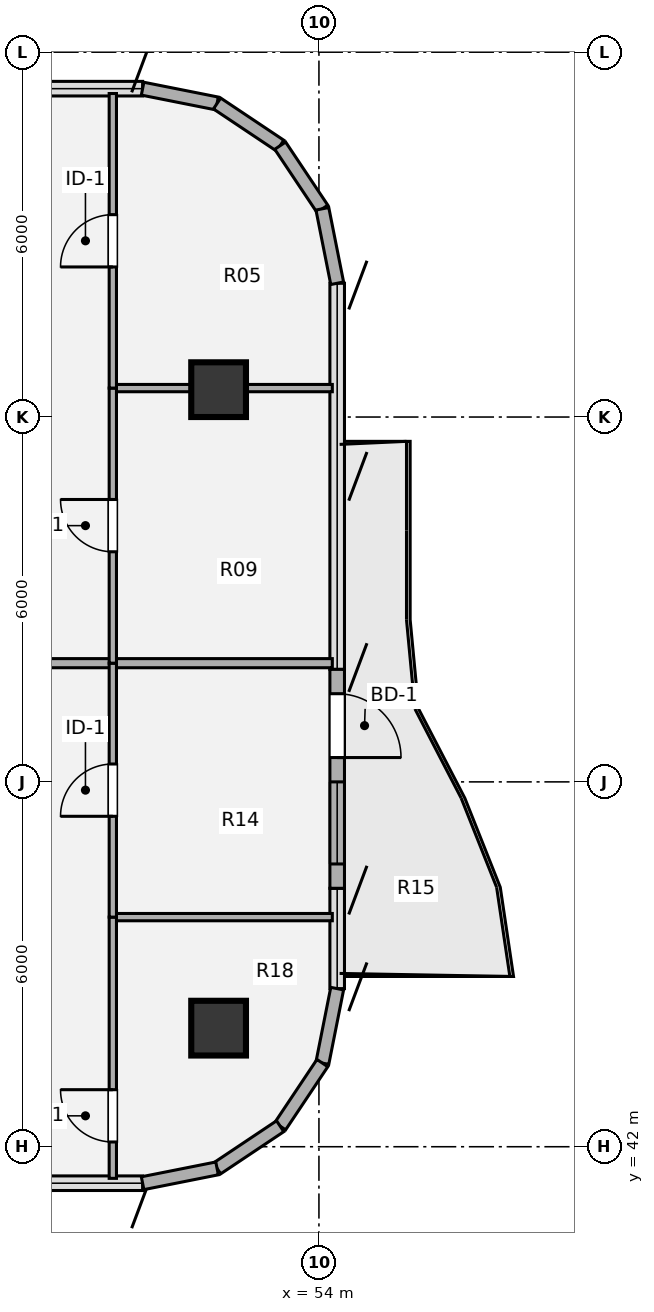
"""IFC4 building model, lengths in metres.
Left out: names, types, materials, properties, quantities, classifications, styles, units other than length and angle.
Written with IfcOpenShell. Run it as: python <this file> out.ifc"""

import sys

from ifc_helpers import new_model, si_unit, direction, frame, frame_2d, origin, origin_2d, place, context, subcontext, project, spatial, rectangle, hollow_circle, extrude, source, transform, mapped, element, fill, save


model = new_model("IFC4")
c1 = context("Model", 3, precision=1e-05, world=origin(), true_north=direction((0.0, 1.0)))
c2 = subcontext(c1, "Body", "Model", "MODEL_VIEW")
j1 = project(units=[si_unit("LENGTHUNIT", "METRE"), si_unit("PLANEANGLEUNIT", "RADIAN")], contexts=[c1])
p1 = place(None, origin())
s1 = spatial("IfcSite", under=j1, at=p1, CompositionType="ELEMENT")
p2 = place(p1, origin())
s2 = spatial("IfcBuilding", under=s1, at=p2, CompositionType="ELEMENT")
p3 = place(p2, frame((0.0, 0.0, 226.8)))
s3 = spatial("IfcBuildingStorey", under=s2, at=p3, CompositionType="ELEMENT", Elevation=226.8)
m1 = source(origin(), c2, "Body", "SweptSolid", [
    extrude(hollow_circle(Radius=0.45, WallThickness=0.032, at=origin_2d()), origin(), (0.0, 0.0, 1.0), 3.78),
])
for number, where, z_axis, x_axis in (
    (1, (52.35, 43.95, 0.0), (0.0, 0.0, 1.0), (1.0, 0.0, 0.0)),
    (2, (52.35, 54.45, 0.0), (0.0, 0.0, 1.0), (1.0, 0.0, 0.0)),
):
    element("IfcColumn", number, at=place(p3, frame(where, z_axis=z_axis, x_axis=x_axis)), inside=s3, PredefinedType="COLUMN", context=c2, shape_type="MappedRepresentation", body=[
        mapped(m1, transform((0.0, 0.0, 0.0), x_axis=(1.0, 0.0, 0.0), y_axis=(0.0, 1.0, 0.0), z_axis=(0.0, 0.0, 1.0), scale=1.0)),
    ])
for number, where, z_axis, x_axis in (
    (3, (51.1, 59.4, 0.0), (0.0, 0.0, 1.0), (0.981, -0.195, 0.0)),
    (4, (52.325, 59.156, 0.0), (0.0, 0.0, 1.0), (0.831, -0.556, 0.0)),
    (5, (53.363, 58.463, 0.0), (0.0, 0.0, 1.0), (0.556, -0.831, 0.0)),
    (6, (54.056, 57.425, 0.0), (0.0, 0.0, 1.0), (0.195, -0.981, 0.0)),
):
    element("IfcWall", number, at=place(p3, frame(where, z_axis=z_axis, x_axis=x_axis)), inside=s3, PredefinedType="SOLIDWALL", context=c2, shape_type="SweptSolid", body=[
        extrude(rectangle(XDim=1.249, YDim=0.215, at=frame_2d((0.624, 0.0))), origin(), (0.0, 0.0, 1.0), 3.53),
    ])
p4 = place(p3, frame((54.3, 49.85, 0.0), z_axis=(0.0, 0.0, 1.0), x_axis=(0.0, -1.0, 0.0)))
e7 = element("IfcWall", 7, at=p4, inside=s3, PredefinedType="SOLIDWALL", context=c2, shape_type="SweptSolid", body=[
    extrude(rectangle(XDim=3.6, YDim=0.24, at=frame_2d((1.8, 0.0))), origin(), (0.0, 0.0, 1.0), 3.53),
])
p5 = place(p4, frame((0.4, 0.0, 0.0)))
e8 = element("IfcOpeningElement", 8, at=p5, cuts=e7, PredefinedType="OPENING", context=c2, shape_type="SweptSolid", body=[
    extrude(rectangle(XDim=1.05, YDim=2.15, at=origin_2d()), frame((0.525, 0.13, 1.075), z_axis=(0.0, -1.0, 0.0), x_axis=(1.0, 0.0, 0.0)), (0.0, 0.0, 1.0), 0.26),
])
p6 = place(p4, frame((1.85, 0.0, 0.85)))
e9 = element("IfcOpeningElement", 9, at=p6, cuts=e7, PredefinedType="OPENING", context=c2, shape_type="SweptSolid", body=[
    extrude(rectangle(XDim=1.35, YDim=1.35, at=origin_2d()), frame((0.675, 0.13, 0.675), z_axis=(0.0, -1.0, 0.0), x_axis=(1.0, 0.0, 0.0)), (0.0, 0.0, 1.0), 0.26),
])
for number, where, z_axis, x_axis in (
    (10, (54.3, 44.6, 0.0), (0.0, 0.0, 1.0), (-0.195, -0.981, 0.0)),
    (11, (54.056, 43.375, 0.0), (0.0, 0.0, 1.0), (-0.556, -0.831, 0.0)),
    (12, (53.363, 42.337, 0.0), (0.0, 0.0, 1.0), (-0.831, -0.556, 0.0)),
    (13, (52.325, 41.644, 0.0), (0.0, 0.0, 1.0), (-0.981, -0.195, 0.0)),
):
    element("IfcWall", number, at=place(p3, frame(where, z_axis=z_axis, x_axis=x_axis)), inside=s3, PredefinedType="SOLIDWALL", context=c2, shape_type="SweptSolid", body=[
        extrude(rectangle(XDim=1.249, YDim=0.215, at=frame_2d((0.624, 0.0))), origin(), (0.0, 0.0, 1.0), 3.53),
    ])
p7 = place(p3, frame((50.61, 45.776, 0.0), z_axis=(0.0, 0.0, 1.0), x_axis=(1.0, 0.0, 0.0)))
e14 = element("IfcWall", 14, at=p7, inside=s3, PredefinedType="PARTITIONING", context=c2, shape_type="SweptSolid", body=[
    extrude(rectangle(XDim=3.61, YDim=0.12, at=frame_2d((1.805, 0.0))), origin(), (0.0, 0.0, 1.0), 2.982),
])
p8 = place(p3, frame((38.45, 49.952, 0.0), z_axis=(0.0, 0.0, 1.0), x_axis=(1.0, 0.0, 0.0)))
e15 = element("IfcWall", 15, at=p8, inside=s3, PredefinedType="PARTITIONING", context=c2, shape_type="SweptSolid", body=[
    extrude(rectangle(XDim=15.77, YDim=0.15, at=frame_2d((7.885, 0.0))), origin(), (0.0, 0.0, 1.0), 2.982),
])
p9 = place(p3, frame((50.61, 54.476, 0.0), z_axis=(0.0, 0.0, 1.0), x_axis=(1.0, 0.0, 0.0)))
e16 = element("IfcWall", 16, at=p9, inside=s3, PredefinedType="PARTITIONING", context=c2, shape_type="SweptSolid", body=[
    extrude(rectangle(XDim=3.61, YDim=0.12, at=frame_2d((1.805, 0.0))), origin(), (0.0, 0.0, 1.0), 2.903),
])
p10 = place(p3, frame((50.61, 41.48, 0.0), z_axis=(0.0, 0.0, 1.0), x_axis=(0.0, 1.0, 0.0)))
e17 = element("IfcWall", 17, at=p10, inside=s3, PredefinedType="PARTITIONING", context=c2, shape_type="SweptSolid", body=[
    extrude(rectangle(XDim=4.296, YDim=0.12, at=frame_2d((2.148, 0.0))), origin(), (0.0, 0.0, 1.0), 3.5),
])
p11 = place(p10, frame((0.598, 0.0, 0.0)))
e18 = element("IfcOpeningElement", 18, at=p11, cuts=e17, PredefinedType="OPENING", context=c2, shape_type="SweptSolid", body=[
    extrude(rectangle(XDim=0.86, YDim=2.1, at=origin_2d()), frame((0.43, 0.07, 1.05), z_axis=(0.0, -1.0, 0.0), x_axis=(1.0, 0.0, 0.0)), (0.0, 0.0, 1.0), 0.14),
])
p12 = place(p3, frame((50.61, 45.776, 0.0), z_axis=(0.0, 0.0, 1.0), x_axis=(0.0, 1.0, 0.0)))
e19 = element("IfcWall", 19, at=p12, inside=s3, PredefinedType="PARTITIONING", context=c2, shape_type="SweptSolid", body=[
    extrude(rectangle(XDim=4.176, YDim=0.12, at=frame_2d((2.088, 0.0))), origin(), (0.0, 0.0, 1.0), 3.5),
])
p13 = place(p12, frame((1.658, 0.0, 0.0)))
e20 = element("IfcOpeningElement", 20, at=p13, cuts=e19, PredefinedType="OPENING", context=c2, shape_type="SweptSolid", body=[
    extrude(rectangle(XDim=0.86, YDim=2.1, at=origin_2d()), frame((0.43, 0.07, 1.05), z_axis=(0.0, -1.0, 0.0), x_axis=(1.0, 0.0, 0.0)), (0.0, 0.0, 1.0), 0.14),
])
p14 = place(p3, frame((50.61, 49.952, 0.0), z_axis=(0.0, 0.0, 1.0), x_axis=(0.0, 1.0, 0.0)))
e21 = element("IfcWall", 21, at=p14, inside=s3, PredefinedType="PARTITIONING", context=c2, shape_type="SweptSolid", body=[
    extrude(rectangle(XDim=4.524, YDim=0.12, at=frame_2d((2.262, 0.0))), origin(), (0.0, 0.0, 1.0), 3.5),
])
p15 = place(p14, frame((1.832, 0.0, 0.0)))
e22 = element("IfcOpeningElement", 22, at=p15, cuts=e21, PredefinedType="OPENING", context=c2, shape_type="SweptSolid", body=[
    extrude(rectangle(XDim=0.86, YDim=2.1, at=origin_2d()), frame((0.43, 0.07, 1.05), z_axis=(0.0, -1.0, 0.0), x_axis=(1.0, 0.0, 0.0)), (0.0, 0.0, 1.0), 0.14),
])
p16 = place(p3, frame((50.61, 54.476, 0.0), z_axis=(0.0, 0.0, 1.0), x_axis=(0.0, 1.0, 0.0)))
e23 = element("IfcWall", 23, at=p16, inside=s3, PredefinedType="PARTITIONING", context=c2, shape_type="SweptSolid", body=[
    extrude(rectangle(XDim=4.844, YDim=0.12, at=frame_2d((2.422, 0.0))), origin(), (0.0, 0.0, 1.0), 3.5),
])
p17 = place(p16, frame((1.992, 0.0, 0.0)))
e24 = element("IfcOpeningElement", 24, at=p17, cuts=e23, PredefinedType="OPENING", context=c2, shape_type="SweptSolid", body=[
    extrude(rectangle(XDim=0.86, YDim=2.1, at=origin_2d()), frame((0.43, 0.07, 1.05), z_axis=(0.0, -1.0, 0.0), x_axis=(1.0, 0.0, 0.0)), (0.0, 0.0, 1.0), 0.14),
])
m2 = source(origin(), c2, "Body", "SweptSolid", [
    extrude(rectangle(XDim=1.05, YDim=2.15, at=origin_2d()), frame((0.525, 0.025, 1.075), z_axis=(0.0, -1.0, 0.0), x_axis=(1.0, 0.0, 0.0)), (0.0, 0.0, 1.0), 0.05),
])
p18 = place(p5, origin())
e25 = element("IfcDoor", 25, at=p18, inside=s3, OperationType="SINGLE_SWING_RIGHT", PredefinedType="DOOR", context=c2, shape_type="MappedRepresentation", body=[
    mapped(m2, transform((0.0, 0.0, 0.0), x_axis=(1.0, 0.0, 0.0), y_axis=(0.0, 1.0, 0.0), z_axis=(0.0, 0.0, 1.0), scale=1.0)),
])
fill(e8, e25)
m3 = source(origin(), c2, "Body", "SweptSolid", [
    extrude(rectangle(XDim=1.35, YDim=1.35, at=origin_2d()), frame((0.675, 0.03, 0.675), z_axis=(0.0, -1.0, 0.0), x_axis=(1.0, 0.0, 0.0)), (0.0, 0.0, 1.0), 0.06),
])
p19 = place(p6, origin())
e26 = element("IfcWindow", 26, at=p19, inside=s3, PartitioningType="SINGLE_PANEL", PredefinedType="WINDOW", context=c2, shape_type="MappedRepresentation", body=[
    mapped(m3, transform((0.0, 0.0, 0.0), x_axis=(1.0, 0.0, 0.0), y_axis=(0.0, 1.0, 0.0), z_axis=(0.0, 0.0, 1.0), scale=1.0)),
])
fill(e9, e26)
m4 = source(origin(), c2, "Body", "SweptSolid", [
    extrude(rectangle(XDim=0.86, YDim=2.1, at=origin_2d()), frame((0.43, 0.025, 1.05), z_axis=(0.0, -1.0, 0.0), x_axis=(1.0, 0.0, 0.0)), (0.0, 0.0, 1.0), 0.05),
])
p20 = place(p11, origin())
e27 = element("IfcDoor", 27, at=p20, inside=s3, OperationType="SINGLE_SWING_RIGHT", PredefinedType="DOOR", context=c2, shape_type="MappedRepresentation", body=[
    mapped(m4, transform((0.0, 0.0, 0.0), x_axis=(1.0, 0.0, 0.0), y_axis=(0.0, 1.0, 0.0), z_axis=(0.0, 0.0, 1.0), scale=1.0)),
])
fill(e18, e27)
p21 = place(p13, origin())
e28 = element("IfcDoor", 28, at=p21, inside=s3, OperationType="SINGLE_SWING_LEFT", PredefinedType="DOOR", context=c2, shape_type="MappedRepresentation", body=[
    mapped(m4, transform((0.0, 0.0, 0.0), x_axis=(1.0, 0.0, 0.0), y_axis=(0.0, 1.0, 0.0), z_axis=(0.0, 0.0, 1.0), scale=1.0)),
])
fill(e20, e28)
p22 = place(p15, origin())
e29 = element("IfcDoor", 29, at=p22, inside=s3, OperationType="SINGLE_SWING_RIGHT", PredefinedType="DOOR", context=c2, shape_type="MappedRepresentation", body=[
    mapped(m4, transform((0.0, 0.0, 0.0), x_axis=(1.0, 0.0, 0.0), y_axis=(0.0, 1.0, 0.0), z_axis=(0.0, 0.0, 1.0), scale=1.0)),
])
fill(e22, e29)
p23 = place(p17, origin())
e30 = element("IfcDoor", 30, at=p23, inside=s3, OperationType="SINGLE_SWING_LEFT", PredefinedType="DOOR", context=c2, shape_type="MappedRepresentation", body=[
    mapped(m4, transform((0.0, 0.0, 0.0), x_axis=(1.0, 0.0, 0.0), y_axis=(0.0, 1.0, 0.0), z_axis=(0.0, 0.0, 1.0), scale=1.0)),
])
fill(e24, e30)
save(model, sys.argv[1])
